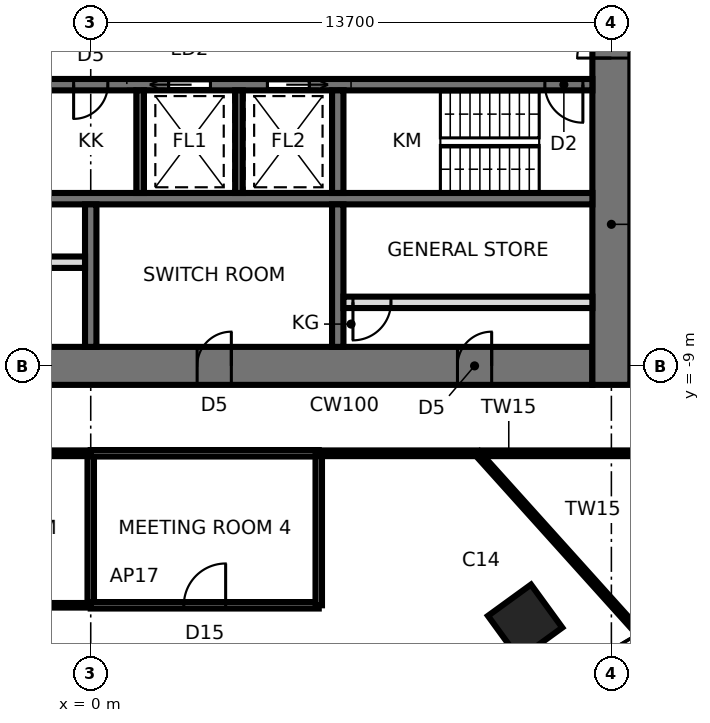
"""IFC4 building model, lengths in metres.
Left out: names, types, materials, properties, quantities, classifications, styles, units other than length and angle.
Written with IfcOpenShell. Run it as: python <this file> out.ifc"""

import sys

from ifc_helpers import new_model, si_unit, direction, frame, frame_2d, origin, origin_2d, place, context, subcontext, project, spatial, rectangle, extrude, element, fill, save


model = new_model("IFC4")
c1 = context("Model", 3, precision=1e-05, world=origin(), true_north=direction((0.0, 1.0)))
c2 = subcontext(c1, "Body", "Model", "MODEL_VIEW")
j1 = project(units=[si_unit("LENGTHUNIT", "METRE"), si_unit("PLANEANGLEUNIT", "RADIAN")], contexts=[c1])
p1 = place(None, origin())
s1 = spatial("IfcSite", under=j1, at=p1, CompositionType="ELEMENT")
p2 = place(p1, origin())
s2 = spatial("IfcBuilding", under=s1, at=p2, CompositionType="ELEMENT")
p3 = place(p2, frame((0.0, 0.0, 195.5)))
s3 = spatial("IfcBuildingStorey", under=s2, at=p3, CompositionType="ELEMENT", Elevation=195.5)
p4 = place(p3, frame((11.43, -15.733, 0.0), z_axis=(0.0, 0.0, 1.0), x_axis=(0.587785252292, -0.809016994375, 0.0)))
e1 = element("IfcColumn", 1, at=p4, inside=s3, PredefinedType="COLUMN", context=c2, shape_type="SweptSolid", body=[
    extrude(rectangle(XDim=1.4, YDim=1.4, at=origin_2d()), origin(), (0.0, 0.0, 1.0), 3.9),
])
p5 = place(p3, frame((-13.2, -9.0, 0.0), z_axis=(0.0, 0.0, 1.0), x_axis=(1.0, 0.0, 0.0)))
e2 = element("IfcWall", 2, at=p5, inside=s3, PredefinedType="SHEAR", context=c2, shape_type="SweptSolid", body=[
    extrude(rectangle(XDim=26.4, YDim=1.0, at=frame_2d((13.2, 0.0))), origin(), (0.0, 0.0, 1.0), 3.9),
])
p6 = place(p5, frame((2.65, 0.0, 0.0)))
e3 = element("IfcOpeningElement", 3, at=p6, cuts=e2, PredefinedType="OPENING", context=c2, shape_type="SweptSolid", body=[
    extrude(rectangle(XDim=0.9, YDim=2.1, at=frame_2d((0.45, 1.05))), frame((0.0, 0.51, 0.0), z_axis=(0.0, -1.0, 0.0), x_axis=(1.0, 0.0, 0.0)), (0.0, 0.0, 1.0), 1.02),
])
p7 = place(p5, frame((9.5, 0.0, 0.0)))
e4 = element("IfcOpeningElement", 4, at=p7, cuts=e2, PredefinedType="OPENING", context=c2, shape_type="SweptSolid", body=[
    extrude(rectangle(XDim=0.9, YDim=2.1, at=frame_2d((0.45, 1.05))), frame((0.0, 0.51, 0.0), z_axis=(0.0, -1.0, 0.0), x_axis=(1.0, 0.0, 0.0)), (0.0, 0.0, 1.0), 1.02),
])
p8 = place(p5, frame((16.0, 0.0, 0.0)))
e5 = element("IfcOpeningElement", 5, at=p8, cuts=e2, PredefinedType="OPENING", context=c2, shape_type="SweptSolid", body=[
    extrude(rectangle(XDim=0.9, YDim=2.1, at=frame_2d((0.45, 1.05))), frame((0.0, 0.51, 0.0), z_axis=(0.0, -1.0, 0.0), x_axis=(1.0, 0.0, 0.0)), (0.0, 0.0, 1.0), 1.02),
])
p9 = place(p5, frame((22.85, 0.0, 0.0)))
e6 = element("IfcOpeningElement", 6, at=p9, cuts=e2, PredefinedType="OPENING", context=c2, shape_type="SweptSolid", body=[
    extrude(rectangle(XDim=0.9, YDim=2.1, at=frame_2d((0.45, 1.05))), frame((0.0, 0.51, 0.0), z_axis=(0.0, -1.0, 0.0), x_axis=(1.0, 0.0, 0.0)), (0.0, 0.0, 1.0), 1.02),
])
p10 = place(p3, frame((13.7, -9.5, 0.0), z_axis=(0.0, 0.0, 1.0), x_axis=(0.0, 1.0, 0.0)))
e7 = element("IfcWall", 7, at=p10, inside=s3, PredefinedType="SHEAR", context=c2, shape_type="SweptSolid", body=[
    extrude(rectangle(XDim=19.0, YDim=1.0, at=frame_2d((9.5, 0.0))), origin(), (0.0, 0.0, 1.0), 3.9),
])
p11 = place(p10, frame((8.6, 0.0, 0.0)))
e8 = element("IfcOpeningElement", 8, at=p11, cuts=e7, PredefinedType="OPENING", context=c2, shape_type="SweptSolid", body=[
    extrude(rectangle(XDim=1.8, YDim=2.4, at=frame_2d((0.9, 1.2))), frame((0.0, 0.51, 0.0), z_axis=(0.0, -1.0, 0.0), x_axis=(1.0, 0.0, 0.0)), (0.0, 0.0, 1.0), 1.02),
])
p12 = place(p3, frame((-13.2, -1.6, 0.0), z_axis=(0.0, 0.0, 1.0), x_axis=(1.0, 0.0, 0.0)))
e9 = element("IfcWall", 9, at=p12, inside=s3, PredefinedType="SHEAR", context=c2, shape_type="SweptSolid", body=[
    extrude(rectangle(XDim=26.4, YDim=0.3, at=frame_2d((13.2, 0.0))), origin(), (0.0, 0.0, 1.0), 3.9),
])
p13 = place(p12, frame((25.15, 0.0, 0.0)))
e10 = element("IfcOpeningElement", 10, at=p13, cuts=e9, PredefinedType="OPENING", context=c2, shape_type="SweptSolid", body=[
    extrude(rectangle(XDim=1.0, YDim=2.1, at=frame_2d((0.5, 1.05))), frame((0.0, 0.16, 0.0), z_axis=(0.0, -1.0, 0.0), x_axis=(1.0, 0.0, 0.0)), (0.0, 0.0, 1.0), 0.32),
])
p14 = place(p12, frame((7.55, 0.0, 0.0)))
e11 = element("IfcOpeningElement", 11, at=p14, cuts=e9, PredefinedType="OPENING", context=c2, shape_type="SweptSolid", body=[
    extrude(rectangle(XDim=0.9, YDim=2.1, at=frame_2d((0.45, 1.05))), frame((0.0, 0.16, 0.0), z_axis=(0.0, -1.0, 0.0), x_axis=(1.0, 0.0, 0.0)), (0.0, 0.0, 1.0), 0.32),
])
p15 = place(p12, frame((10.15, 0.0, 0.0)))
e12 = element("IfcOpeningElement", 12, at=p15, cuts=e9, PredefinedType="OPENING", context=c2, shape_type="SweptSolid", body=[
    extrude(rectangle(XDim=0.9, YDim=2.1, at=frame_2d((0.45, 1.05))), frame((0.0, 0.16, 0.0), z_axis=(0.0, -1.0, 0.0), x_axis=(1.0, 0.0, 0.0)), (0.0, 0.0, 1.0), 0.32),
])
p16 = place(p12, frame((12.75, 0.0, 0.0)))
e13 = element("IfcOpeningElement", 13, at=p16, cuts=e9, PredefinedType="OPENING", context=c2, shape_type="SweptSolid", body=[
    extrude(rectangle(XDim=0.9, YDim=2.1, at=frame_2d((0.45, 1.05))), frame((0.0, 0.16, 0.0), z_axis=(0.0, -1.0, 0.0), x_axis=(1.0, 0.0, 0.0)), (0.0, 0.0, 1.0), 0.32),
])
p17 = place(p12, frame((15.25, 0.0, 0.0)))
e14 = element("IfcOpeningElement", 14, at=p17, cuts=e9, PredefinedType="OPENING", context=c2, shape_type="SweptSolid", body=[
    extrude(rectangle(XDim=1.1, YDim=2.3, at=frame_2d((0.55, 1.15))), frame((0.0, 0.16, 0.0), z_axis=(0.0, -1.0, 0.0), x_axis=(1.0, 0.0, 0.0)), (0.0, 0.0, 1.0), 0.32),
])
p18 = place(p12, frame((17.85, 0.0, 0.0)))
e15 = element("IfcOpeningElement", 15, at=p18, cuts=e9, PredefinedType="OPENING", context=c2, shape_type="SweptSolid", body=[
    extrude(rectangle(XDim=1.1, YDim=2.3, at=frame_2d((0.55, 1.15))), frame((0.0, 0.16, 0.0), z_axis=(0.0, -1.0, 0.0), x_axis=(1.0, 0.0, 0.0)), (0.0, 0.0, 1.0), 0.32),
])
p19 = place(p12, frame((4.85, 0.0, 0.0)))
e16 = element("IfcOpeningElement", 16, at=p19, cuts=e9, PredefinedType="OPENING", context=c2, shape_type="SweptSolid", body=[
    extrude(rectangle(XDim=1.1, YDim=2.3, at=frame_2d((0.55, 1.15))), frame((0.0, 0.16, 0.0), z_axis=(0.0, -1.0, 0.0), x_axis=(1.0, 0.0, 0.0)), (0.0, 0.0, 1.0), 0.32),
])
p20 = place(p12, frame((2.25, 0.0, 0.0)))
e17 = element("IfcOpeningElement", 17, at=p20, cuts=e9, PredefinedType="OPENING", context=c2, shape_type="SweptSolid", body=[
    extrude(rectangle(XDim=1.1, YDim=2.3, at=frame_2d((0.55, 1.15))), frame((0.0, 0.16, 0.0), z_axis=(0.0, -1.0, 0.0), x_axis=(1.0, 0.0, 0.0)), (0.0, 0.0, 1.0), 0.32),
])
p21 = place(p12, frame((0.35, 0.0, 0.0)))
e18 = element("IfcOpeningElement", 18, at=p21, cuts=e9, PredefinedType="OPENING", context=c2, shape_type="SweptSolid", body=[
    extrude(rectangle(XDim=0.9, YDim=2.1, at=frame_2d((0.45, 1.05))), frame((0.0, 0.16, 0.0), z_axis=(0.0, -1.0, 0.0), x_axis=(1.0, 0.0, 0.0)), (0.0, 0.0, 1.0), 0.32),
])
p22 = place(p3, frame((-13.2, -4.6, 0.0), z_axis=(0.0, 0.0, 1.0), x_axis=(1.0, 0.0, 0.0)))
e19 = element("IfcWall", 19, at=p22, inside=s3, PredefinedType="SHEAR", context=c2, shape_type="SweptSolid", body=[
    extrude(rectangle(XDim=26.4, YDim=0.3, at=frame_2d((13.2, 0.0))), origin(), (0.0, 0.0, 1.0), 3.9),
])
p23 = place(p3, frame((6.5, -1.75, 0.0), z_axis=(0.0, 0.0, 1.0), x_axis=(0.0, -1.0, 0.0)))
e20 = element("IfcWall", 20, at=p23, inside=s3, PredefinedType="SHEAR", context=c2, shape_type="SweptSolid", body=[
    extrude(rectangle(XDim=2.7, YDim=0.3, at=frame_2d((1.35, 0.0))), origin(), (0.0, 0.0, 1.0), 3.9),
])
p24 = place(p3, frame((6.5, -4.75, 0.0), z_axis=(0.0, 0.0, 1.0), x_axis=(0.0, -1.0, 0.0)))
e21 = element("IfcWall", 21, at=p24, inside=s3, PredefinedType="SHEAR", context=c2, shape_type="SweptSolid", body=[
    extrude(rectangle(XDim=3.75, YDim=0.3, at=frame_2d((1.875, 0.0))), origin(), (0.0, 0.0, 1.0), 3.9),
])
for number, where, z_axis, x_axis in (
    (22, (1.3, -1.75, 0.0), (0.0, 0.0, 1.0), (0.0, -1.0, 0.0)),
    (23, (3.9, -1.75, 0.0), (0.0, 0.0, 1.0), (0.0, -1.0, 0.0)),
):
    element("IfcWall", number, at=place(p3, frame(where, z_axis=z_axis, x_axis=x_axis)), inside=s3, PredefinedType="SHEAR", context=c2, shape_type="SweptSolid", body=[
        extrude(rectangle(XDim=2.7, YDim=0.2, at=frame_2d((1.35, 0.0))), origin(), (0.0, 0.0, 1.0), 3.9),
    ])
p25 = place(p3, frame((0.0, -4.75, 0.0), z_axis=(0.0, 0.0, 1.0), x_axis=(0.0, -1.0, 0.0)))
e24 = element("IfcWall", 24, at=p25, inside=s3, PredefinedType="SHEAR", context=c2, shape_type="SweptSolid", body=[
    extrude(rectangle(XDim=3.75, YDim=0.3, at=frame_2d((1.875, 0.0))), origin(), (0.0, 0.0, 1.0), 3.9),
])
p26 = place(p3, frame((-6.35, -6.272, 0.0), z_axis=(0.0, 0.0, 1.0), x_axis=(1.0, 0.0, 0.0)))
e25 = element("IfcWall", 25, at=p26, inside=s3, PredefinedType="PARTITIONING", context=c2, shape_type="SweptSolid", body=[
    extrude(rectangle(XDim=6.2, YDim=0.3, at=frame_2d((3.1, 0.0))), origin(), (0.0, 0.0, 1.0), 3.74),
])
p27 = place(p26, frame((0.25, 0.0, 0.0)))
e26 = element("IfcOpeningElement", 26, at=p27, cuts=e25, PredefinedType="OPENING", context=c2, shape_type="SweptSolid", body=[
    extrude(rectangle(XDim=1.0, YDim=2.4, at=frame_2d((0.5, 1.2))), frame((0.0, 0.16, 0.0), z_axis=(0.0, -1.0, 0.0), x_axis=(1.0, 0.0, 0.0)), (0.0, 0.0, 1.0), 0.32),
])
p28 = place(p3, frame((6.65, -7.328, 0.0), z_axis=(0.0, 0.0, 1.0), x_axis=(1.0, 0.0, 0.0)))
e27 = element("IfcWall", 27, at=p28, inside=s3, PredefinedType="PARTITIONING", context=c2, shape_type="SweptSolid", body=[
    extrude(rectangle(XDim=6.55, YDim=0.3, at=frame_2d((3.275, 0.0))), origin(), (0.0, 0.0, 1.0), 3.74),
])
p29 = place(p28, frame((0.25, 0.0, 0.0)))
e28 = element("IfcOpeningElement", 28, at=p29, cuts=e27, PredefinedType="OPENING", context=c2, shape_type="SweptSolid", body=[
    extrude(rectangle(XDim=1.0, YDim=2.4, at=frame_2d((0.5, 1.2))), frame((0.0, 0.16, 0.0), z_axis=(0.0, -1.0, 0.0), x_axis=(1.0, 0.0, 0.0)), (0.0, 0.0, 1.0), 0.32),
])
p30 = place(p3, frame((-16.0, -11.3, 0.0), z_axis=(0.0, 0.0, 1.0), x_axis=(1.0, 0.0, 0.0)))
e29 = element("IfcWall", 29, at=p30, inside=s3, PredefinedType="PARTITIONING", context=c2, shape_type="SweptSolid", body=[
    extrude(rectangle(XDim=16.0, YDim=0.15, at=frame_2d((8.0, 0.0))), origin(), (0.0, 0.0, 1.0), 3.74),
])
p31 = place(p3, frame((-11.0, -15.3, 0.0), z_axis=(0.0, 0.0, 1.0), x_axis=(1.0, 0.0, 0.0)))
e30 = element("IfcWall", 30, at=p31, inside=s3, PredefinedType="PARTITIONING", context=c2, shape_type="SweptSolid", body=[
    extrude(rectangle(XDim=11.0, YDim=0.12, at=frame_2d((5.5, 0.0))), origin(), (0.0, 0.0, 1.0), 3.334),
])
p32 = place(p31, frame((2.5, 0.0, 0.0)))
e31 = element("IfcOpeningElement", 31, at=p32, cuts=e30, PredefinedType="OPENING", context=c2, shape_type="SweptSolid", body=[
    extrude(rectangle(XDim=1.0, YDim=2.4, at=frame_2d((0.5, 1.2))), frame((0.0, 0.07, 0.0), z_axis=(0.0, -1.0, 0.0), x_axis=(1.0, 0.0, 0.0)), (0.0, 0.0, 1.0), 0.14),
])
p33 = place(p31, frame((8.0, 0.0, 0.0)))
e32 = element("IfcOpeningElement", 32, at=p33, cuts=e30, PredefinedType="OPENING", context=c2, shape_type="SweptSolid", body=[
    extrude(rectangle(XDim=1.0, YDim=2.4, at=frame_2d((0.5, 1.2))), frame((0.0, 0.07, 0.0), z_axis=(0.0, -1.0, 0.0), x_axis=(1.0, 0.0, 0.0)), (0.0, 0.0, 1.0), 0.14),
])
p34 = place(p3, frame((0.0, -15.3, 0.0), z_axis=(0.0, 0.0, 1.0), x_axis=(0.0, 1.0, 0.0)))
e33 = element("IfcWall", 33, at=p34, inside=s3, PredefinedType="PARTITIONING", context=c2, shape_type="SweptSolid", body=[
    extrude(rectangle(XDim=4.0, YDim=0.17, at=frame_2d((2.0, 0.0))), origin(), (0.0, 0.0, 1.0), 3.04),
])
p35 = place(p3, frame((0.0, -15.3, 0.0), z_axis=(0.0, 0.0, 1.0), x_axis=(1.0, 0.0, 0.0)))
e34 = element("IfcWall", 34, at=p35, inside=s3, PredefinedType="PARTITIONING", context=c2, shape_type="SweptSolid", body=[
    extrude(rectangle(XDim=6.0, YDim=0.17, at=frame_2d((3.0, 0.0))), origin(), (0.0, 0.0, 1.0), 3.334),
])
p36 = place(p35, frame((2.45, 0.0, 0.0)))
e35 = element("IfcOpeningElement", 35, at=p36, cuts=e34, PredefinedType="OPENING", context=c2, shape_type="SweptSolid", body=[
    extrude(rectangle(XDim=1.1, YDim=2.4, at=frame_2d((0.55, 1.2))), frame((0.0, 0.095, 0.0), z_axis=(0.0, -1.0, 0.0), x_axis=(1.0, 0.0, 0.0)), (0.0, 0.0, 1.0), 0.19),
])
p37 = place(p3, frame((6.0, -11.3, 0.0), z_axis=(0.0, 0.0, 1.0), x_axis=(-1.0, 0.0, 0.0)))
e36 = element("IfcWall", 36, at=p37, inside=s3, PredefinedType="PARTITIONING", context=c2, shape_type="SweptSolid", body=[
    extrude(rectangle(XDim=6.0, YDim=0.17, at=frame_2d((3.0, 0.0))), origin(), (0.0, 0.0, 1.0), 3.74),
])
p38 = place(p3, frame((6.0, -15.3, 0.0), z_axis=(0.0, 0.0, 1.0), x_axis=(0.0, 1.0, 0.0)))
e37 = element("IfcWall", 37, at=p38, inside=s3, PredefinedType="PARTITIONING", context=c2, shape_type="SweptSolid", body=[
    extrude(rectangle(XDim=4.0, YDim=0.17, at=frame_2d((2.0, 0.0))), origin(), (0.0, 0.0, 1.0), 3.74),
])
p39 = place(p3, frame((14.385, -15.976, 0.0), z_axis=(0.0, 0.0, 1.0), x_axis=(-0.669144767844, 0.743132074174, 0.0)))
e38 = element("IfcWall", 38, at=p39, inside=s3, PredefinedType="PARTITIONING", context=c2, shape_type="SweptSolid", body=[
    extrude(rectangle(XDim=6.293, YDim=0.15, at=frame_2d((3.146, 0.0))), origin(), (0.0, 0.0, 1.0), 3.74),
])
p40 = place(p3, frame((6.0, -11.3, 0.0), z_axis=(0.0, 0.0, 1.0), x_axis=(1.0, 0.0, 0.0)))
e39 = element("IfcWall", 39, at=p40, inside=s3, PredefinedType="PARTITIONING", context=c2, shape_type="SweptSolid", body=[
    extrude(rectangle(XDim=10.0, YDim=0.15, at=frame_2d((5.0, 0.0))), origin(), (0.0, 0.0, 1.0), 3.74),
])
p41 = place(p11, origin())
e40 = element("IfcDoor", 40, at=p41, inside=s3, OperationType="DOUBLE_DOOR_SINGLE_SWING", PredefinedType="DOOR", context=c2, shape_type="SweptSolid", body=[
    extrude(rectangle(XDim=1.72, YDim=2.36, at=frame_2d((0.9, 1.18))), frame((0.0, 0.025, 0.0), z_axis=(0.0, -1.0, 0.0), x_axis=(1.0, 0.0, 0.0)), (0.0, 0.0, 1.0), 0.05),
    extrude(rectangle(XDim=0.04, YDim=2.4, at=frame_2d((0.02, 1.2))), frame((0.0, 0.25, 0.0), z_axis=(0.0, -1.0, 0.0), x_axis=(1.0, 0.0, 0.0)), (0.0, 0.0, 1.0), 0.5),
    extrude(rectangle(XDim=0.04, YDim=2.4, at=frame_2d((1.78, 1.2))), frame((0.0, 0.25, 0.0), z_axis=(0.0, -1.0, 0.0), x_axis=(1.0, 0.0, 0.0)), (0.0, 0.0, 1.0), 0.5),
    extrude(rectangle(XDim=1.72, YDim=0.04, at=frame_2d((0.9, 2.38))), frame((0.0, 0.25, 0.0), z_axis=(0.0, -1.0, 0.0), x_axis=(1.0, 0.0, 0.0)), (0.0, 0.0, 1.0), 0.5),
])
fill(e8, e40)
p42 = place(p13, frame((1.0, 0.0, 0.0), z_axis=(0.0, 0.0, 1.0), x_axis=(-1.0, 0.0, 0.0)))
e41 = element("IfcDoor", 41, at=p42, inside=s3, OperationType="SINGLE_SWING_LEFT", PredefinedType="DOOR", context=c2, shape_type="SweptSolid", body=[
    extrude(rectangle(XDim=1.0, YDim=2.1, at=frame_2d((0.5, 1.05))), frame((0.0, 0.025, 0.0), z_axis=(0.0, -1.0, 0.0), x_axis=(1.0, 0.0, 0.0)), (0.0, 0.0, 1.0), 0.05),
])
fill(e10, e41)
p43 = place(p16, frame((0.9, 0.0, 0.0), z_axis=(0.0, 0.0, 1.0), x_axis=(-1.0, 0.0, 0.0)))
e42 = element("IfcDoor", 42, at=p43, inside=s3, OperationType="SINGLE_SWING_RIGHT", PredefinedType="DOOR", context=c2, shape_type="SweptSolid", body=[
    extrude(rectangle(XDim=0.9, YDim=2.1, at=frame_2d((0.45, 1.05))), frame((0.0, 0.025, 0.0), z_axis=(0.0, -1.0, 0.0), x_axis=(1.0, 0.0, 0.0)), (0.0, 0.0, 1.0), 0.05),
])
fill(e13, e42)
p44 = place(p17, frame((1.1, 0.0, 0.0), z_axis=(0.0, 0.0, 1.0), x_axis=(-1.0, 0.0, 0.0)))
e43 = element("IfcDoor", 43, at=p44, inside=s3, OperationType="SLIDING_TO_RIGHT", PredefinedType="DOOR", context=c2, shape_type="SweptSolid", body=[
    extrude(rectangle(XDim=1.1, YDim=2.3, at=frame_2d((0.55, 1.15))), frame((0.0, 0.025, 0.0), z_axis=(0.0, -1.0, 0.0), x_axis=(1.0, 0.0, 0.0)), (0.0, 0.0, 1.0), 0.05),
])
fill(e14, e43)
p45 = place(p18, frame((1.1, 0.0, 0.0), z_axis=(0.0, 0.0, 1.0), x_axis=(-1.0, 0.0, 0.0)))
e44 = element("IfcDoor", 44, at=p45, inside=s3, OperationType="SLIDING_TO_LEFT", PredefinedType="DOOR", context=c2, shape_type="SweptSolid", body=[
    extrude(rectangle(XDim=1.1, YDim=2.3, at=frame_2d((0.55, 1.15))), frame((0.0, 0.025, 0.0), z_axis=(0.0, -1.0, 0.0), x_axis=(1.0, 0.0, 0.0)), (0.0, 0.0, 1.0), 0.05),
])
fill(e15, e44)
p46 = place(p8, origin())
e45 = element("IfcDoor", 45, at=p46, inside=s3, OperationType="SINGLE_SWING_RIGHT", PredefinedType="DOOR", context=c2, shape_type="SweptSolid", body=[
    extrude(rectangle(XDim=0.82, YDim=2.06, at=frame_2d((0.45, 1.03))), frame((0.0, 0.025, 0.0), z_axis=(0.0, -1.0, 0.0), x_axis=(1.0, 0.0, 0.0)), (0.0, 0.0, 1.0), 0.05),
    extrude(rectangle(XDim=0.04, YDim=2.1, at=frame_2d((0.02, 1.05))), frame((0.0, 0.25, 0.0), z_axis=(0.0, -1.0, 0.0), x_axis=(1.0, 0.0, 0.0)), (0.0, 0.0, 1.0), 0.5),
    extrude(rectangle(XDim=0.04, YDim=2.1, at=frame_2d((0.88, 1.05))), frame((0.0, 0.25, 0.0), z_axis=(0.0, -1.0, 0.0), x_axis=(1.0, 0.0, 0.0)), (0.0, 0.0, 1.0), 0.5),
    extrude(rectangle(XDim=0.82, YDim=0.04, at=frame_2d((0.45, 2.08))), frame((0.0, 0.25, 0.0), z_axis=(0.0, -1.0, 0.0), x_axis=(1.0, 0.0, 0.0)), (0.0, 0.0, 1.0), 0.5),
])
fill(e5, e45)
p47 = place(p9, origin())
e46 = element("IfcDoor", 46, at=p47, inside=s3, OperationType="SINGLE_SWING_RIGHT", PredefinedType="DOOR", context=c2, shape_type="SweptSolid", body=[
    extrude(rectangle(XDim=0.82, YDim=2.06, at=frame_2d((0.45, 1.03))), frame((0.0, 0.025, 0.0), z_axis=(0.0, -1.0, 0.0), x_axis=(1.0, 0.0, 0.0)), (0.0, 0.0, 1.0), 0.05),
    extrude(rectangle(XDim=0.04, YDim=2.1, at=frame_2d((0.02, 1.05))), frame((0.0, 0.25, 0.0), z_axis=(0.0, -1.0, 0.0), x_axis=(1.0, 0.0, 0.0)), (0.0, 0.0, 1.0), 0.5),
    extrude(rectangle(XDim=0.04, YDim=2.1, at=frame_2d((0.88, 1.05))), frame((0.0, 0.25, 0.0), z_axis=(0.0, -1.0, 0.0), x_axis=(1.0, 0.0, 0.0)), (0.0, 0.0, 1.0), 0.5),
    extrude(rectangle(XDim=0.82, YDim=0.04, at=frame_2d((0.45, 2.08))), frame((0.0, 0.25, 0.0), z_axis=(0.0, -1.0, 0.0), x_axis=(1.0, 0.0, 0.0)), (0.0, 0.0, 1.0), 0.5),
])
fill(e6, e46)
p48 = place(p29, frame((1.0, 0.0, 0.0), z_axis=(0.0, 0.0, 1.0), x_axis=(-1.0, 0.0, 0.0)))
e47 = element("IfcDoor", 47, at=p48, inside=s3, OperationType="SINGLE_SWING_RIGHT", PredefinedType="DOOR", context=c2, shape_type="SweptSolid", body=[
    extrude(rectangle(XDim=1.0, YDim=2.4, at=frame_2d((0.5, 1.2))), frame((0.0, 0.025, 0.0), z_axis=(0.0, -1.0, 0.0), x_axis=(1.0, 0.0, 0.0)), (0.0, 0.0, 1.0), 0.05),
])
fill(e28, e47)
p49 = place(p36, origin())
e48 = element("IfcDoor", 48, at=p49, inside=s3, OperationType="SINGLE_SWING_RIGHT", PredefinedType="DOOR", context=c2, shape_type="SweptSolid", body=[
    extrude(rectangle(XDim=1.1, YDim=2.4, at=frame_2d((0.55, 1.2))), frame((0.0, 0.025, 0.0), z_axis=(0.0, -1.0, 0.0), x_axis=(1.0, 0.0, 0.0)), (0.0, 0.0, 1.0), 0.05),
])
fill(e35, e48)
save(model, sys.argv[1])
